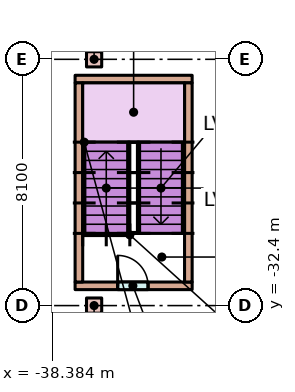
"""IFC4 building model, lengths in metres.
Left out: names, types, materials, properties, quantities, classifications, styles, units other than length and angle.
Written with IfcOpenShell. Run it as: python <this file> out.ifc"""

import sys

from ifc_helpers import new_model, si_unit, direction, frame, frame_2d, origin, origin_2d, place, context, subcontext, project, spatial, rectangle, extrude, element, fill, save


model = new_model("IFC4")
c1 = context("Model", 3, precision=1e-05, world=origin(), true_north=direction((0.0, 1.0)))
c2 = subcontext(c1, "Body", "Model", "MODEL_VIEW")
j1 = project(units=[si_unit("LENGTHUNIT", "METRE"), si_unit("PLANEANGLEUNIT", "RADIAN")], contexts=[c1])
p1 = place(None, origin())
s1 = spatial("IfcSite", under=j1, at=p1, CompositionType="ELEMENT")
p2 = place(p1, origin())
s2 = spatial("IfcBuilding", under=s1, at=p2, CompositionType="ELEMENT")
p3 = place(p2, frame((0.0, 0.0, -3.6)))
s3 = spatial("IfcBuildingStorey", under=s2, at=p3, CompositionType="ELEMENT", Elevation=-3.6)
for number, where, z_axis, x_axis in (
    (1, (-37.0, -32.4, 0.0), (0.0, 0.0, 1.0), (1.0, 0.0, 0.0)),
    (2, (-37.0, -24.3, 0.0), (0.0, 0.0, 1.0), (1.0, 0.0, 0.0)),
):
    element("IfcColumn", number, at=place(p3, frame(where, z_axis=z_axis, x_axis=x_axis)), inside=s3, PredefinedType="COLUMN", context=c2, shape_type="SweptSolid", body=[
        extrude(rectangle(XDim=0.5, YDim=0.5, at=origin_2d()), origin(), (0.0, 0.0, 1.0), 3.6),
    ])
p4 = place(p3, frame((-37.625, -31.75, 0.0), z_axis=(0.0, 0.0, 1.0), x_axis=(1.0, 0.0, 0.0)))
e3 = element("IfcWall", 3, at=p4, inside=s3, PredefinedType="STANDARD", context=c2, shape_type="SweptSolid", body=[
    extrude(rectangle(XDim=3.85, YDim=0.25, at=frame_2d((1.925, 0.0))), origin(), (0.0, 0.0, 1.0), 3.15),
])
p5 = place(p4, frame((1.4, 0.0, 0.0)))
e4 = element("IfcOpeningElement", 4, at=p5, cuts=e3, PredefinedType="OPENING", context=c2, shape_type="SweptSolid", body=[
    extrude(rectangle(XDim=1.0, YDim=2.1, at=frame_2d((0.5, 1.05))), frame((0.0, 0.135, 0.0), z_axis=(0.0, -1.0, 0.0), x_axis=(1.0, 0.0, 0.0)), (0.0, 0.0, 1.0), 0.27),
])
p6 = place(p3, frame((-37.625, -24.95, 0.0), z_axis=(0.0, 0.0, 1.0), x_axis=(1.0, 0.0, 0.0)))
e5 = element("IfcWall", 5, at=p6, inside=s3, PredefinedType="STANDARD", context=c2, shape_type="SweptSolid", body=[
    extrude(rectangle(XDim=3.85, YDim=0.25, at=frame_2d((1.925, 0.0))), origin(), (0.0, 0.0, 1.0), 3.15),
])
for number, where, z_axis, x_axis in (
    (6, (-37.5, -31.625, 0.0), (0.0, 0.0, 1.0), (0.0, 1.0, 0.0)),
    (7, (-33.9, -31.625, 0.0), (0.0, 0.0, 1.0), (0.0, 1.0, 0.0)),
):
    element("IfcWall", number, at=place(p3, frame(where, z_axis=z_axis, x_axis=x_axis)), inside=s3, PredefinedType="STANDARD", context=c2, shape_type="SweptSolid", body=[
        extrude(rectangle(XDim=6.55, YDim=0.25, at=frame_2d((3.275, 0.0))), origin(), (0.0, 0.0, 1.0), 3.15),
    ])
p7 = place(p5, origin())
e8 = element("IfcDoor", 8, at=p7, inside=s3, OperationType="SINGLE_SWING_LEFT", PredefinedType="DOOR", context=c2, shape_type="SweptSolid", body=[
    extrude(rectangle(XDim=1.0, YDim=2.1, at=frame_2d((0.5, 1.05))), frame((0.0, 0.025, 0.0), z_axis=(0.0, -1.0, 0.0), x_axis=(1.0, 0.0, 0.0)), (0.0, 0.0, 1.0), 0.05),
])
fill(e4, e8)
save(model, sys.argv[1])
